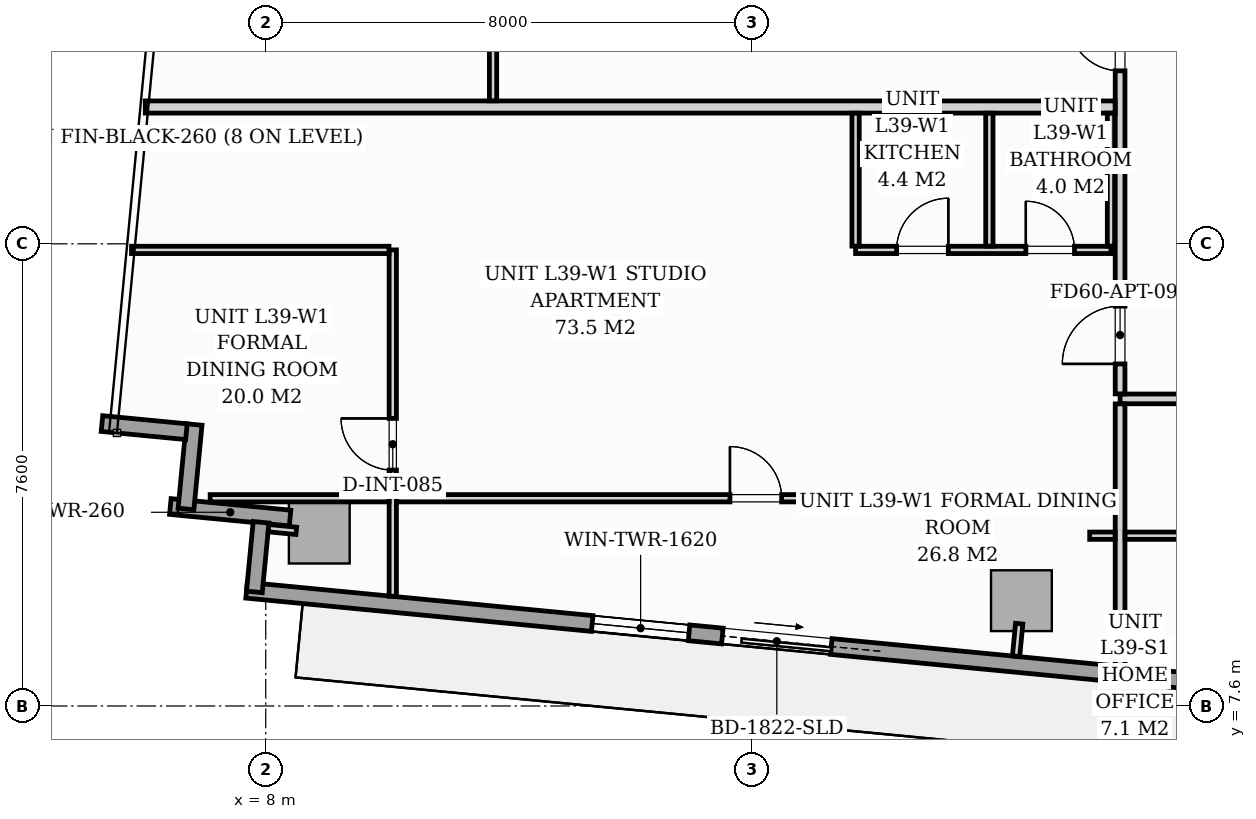
"""IFC4 building model, lengths in metres.
Left out: names, types, materials, properties, quantities, classifications, styles, units other than length and angle.
Written with IfcOpenShell. Run it as: python <this file> out.ifc"""

import sys

from ifc_helpers import new_model, si_unit, direction, frame, frame_2d, origin, origin_2d, place, context, subcontext, project, spatial, rectangle, extrude, source, transform, mapped, element, fill, save


model = new_model("IFC4")
c1 = context("Model", 3, precision=1e-05, world=origin(), true_north=direction((0.0, 1.0)))
c2 = subcontext(c1, "Body", "Model", "MODEL_VIEW")
j1 = project(units=[si_unit("LENGTHUNIT", "METRE"), si_unit("PLANEANGLEUNIT", "RADIAN")], contexts=[c1])
p1 = place(None, origin())
s1 = spatial("IfcSite", under=j1, at=p1, CompositionType="ELEMENT")
p2 = place(p1, origin())
s2 = spatial("IfcBuilding", under=s1, at=p2, CompositionType="ELEMENT")
p3 = place(p2, frame((0.0, 0.0, 137.4)))
s3 = spatial("IfcBuildingStorey", under=s2, at=p3, CompositionType="ELEMENT", Elevation=137.4)
m1 = source(origin(), c2, "Body", "SweptSolid", [
    extrude(rectangle(XDim=1.0, YDim=1.0, at=origin_2d()), origin(), (0.0, 0.0, 1.0), 3.196),
])
for number, where, z_axis, x_axis in (
    (1, (8.881, 10.443, 0.002), (0.0, 0.0, 1.0), (0.995, -0.096, 0.0)),
    (2, (20.427, 9.332, 0.002), (0.0, 0.0, 1.0), (0.995, -0.096, 0.0)),
):
    element("IfcColumn", number, at=place(p3, frame(where, z_axis=z_axis, x_axis=x_axis)), inside=s3, PredefinedType="COLUMN", context=c2, shape_type="MappedRepresentation", body=[
        mapped(m1, transform((0.0, 0.0, 0.0), scale=1.0)),
    ])
p4 = place(p3, frame((8.4, 10.69, 0.0), z_axis=(0.0, 0.0, 1.0), x_axis=(-0.995391147587, 0.095898192396, 0.0)))
e3 = element("IfcWall", 3, at=p4, inside=s3, PredefinedType="STANDARD", context=c2, shape_type="SweptSolid", body=[
    extrude(rectangle(XDim=1.978, YDim=0.26, at=frame_2d((0.989, 0.0))), origin(), (0.0, 0.0, 1.0), 2.94),
])
p5 = place(p3, frame((6.688, 10.84, 0.0), z_axis=(0.0, 0.0, 1.0), x_axis=(0.09589913835, 0.995391056452, 0.0)))
e4 = element("IfcWall", 4, at=p5, inside=s3, PredefinedType="STANDARD", context=c2, shape_type="SweptSolid", body=[
    extrude(rectangle(XDim=1.395, YDim=0.26, at=frame_2d((0.698, 0.0))), origin(), (0.0, 0.0, 1.0), 2.94),
])
p6 = place(p3, frame((6.695, 12.111, 0.0), z_axis=(0.0, 0.0, 1.0), x_axis=(-0.99540614245, 0.095742423056, 0.0)))
e5 = element("IfcWall", 5, at=p6, inside=s3, PredefinedType="STANDARD", context=c2, shape_type="SweptSolid", body=[
    extrude(rectangle(XDim=1.395, YDim=0.26, at=frame_2d((0.697, 0.0))), origin(), (0.0, 0.0, 1.0), 2.94),
])
p7 = place(p3, frame((24.617, 7.873, 0.0), z_axis=(0.0, 0.0, 1.0), x_axis=(-0.995395976631, 0.095848055311, 0.0)))
e6 = element("IfcWall", 6, at=p7, inside=s3, PredefinedType="STANDARD", context=c2, shape_type="SweptSolid", body=[
    extrude(rectangle(XDim=17.01, YDim=0.26, at=frame_2d((8.505, 0.0))), origin(), (0.0, 0.0, 1.0), 2.94),
])
p8 = place(p7, frame((7.35, 0.0, 0.0)))
e7 = element("IfcOpeningElement", 7, at=p8, cuts=e6, PredefinedType="OPENING", context=c2, shape_type="SweptSolid", body=[
    extrude(rectangle(XDim=1.8, YDim=2.06, at=frame_2d((0.9, 1.03))), frame((0.0, 0.14, 0.0), z_axis=(0.0, -1.0, 0.0), x_axis=(1.0, 0.0, 0.0)), (0.0, 0.0, 1.0), 0.28),
])
p9 = place(p7, frame((9.7, 0.0, 0.65)))
e8 = element("IfcOpeningElement", 8, at=p9, cuts=e6, PredefinedType="OPENING", context=c2, shape_type="SweptSolid", body=[
    extrude(rectangle(XDim=1.6, YDim=1.5, at=frame_2d((0.8, 0.75))), frame((0.0, 0.14, 0.0), z_axis=(0.0, -1.0, 0.0), x_axis=(1.0, 0.0, 0.0)), (0.0, 0.0, 1.0), 0.28),
])
p10 = place(p3, frame((7.813, 9.476, 0.0), z_axis=(0.0, 0.0, 1.0), x_axis=(0.09576095695, 0.995404359607, 0.0)))
e9 = element("IfcWall", 9, at=p10, inside=s3, PredefinedType="STANDARD", context=c2, shape_type="SweptSolid", body=[
    extrude(rectangle(XDim=1.15, YDim=0.26, at=frame_2d((0.575, 0.0))), origin(), (0.0, 0.0, 1.0), 2.94),
])
p11 = place(p3, frame((22.05, 12.65, 0.0), z_axis=(0.0, 0.0, 1.0), x_axis=(1.0, 0.0, 0.0)))
e10 = element("IfcWall", 10, at=p11, inside=s3, PredefinedType="PARTITIONING", context=c2, shape_type="SweptSolid", body=[
    extrude(rectangle(XDim=23.83, YDim=0.16, at=frame_2d((11.915, 0.0))), origin(), (0.0, 0.0, 1.0), 2.94),
])
p12 = place(p11, frame((3.0, 0.0, 0.0)))
e11 = element("IfcOpeningElement", 11, at=p12, cuts=e10, PredefinedType="OPENING", context=c2, shape_type="SweptSolid", body=[
    extrude(rectangle(XDim=0.95, YDim=2.06, at=frame_2d((0.475, 1.03))), frame((0.0, 0.09, 0.0), z_axis=(0.0, -1.0, 0.0), x_axis=(1.0, 0.0, 0.0)), (0.0, 0.0, 1.0), 0.18),
])
p13 = place(p11, frame((15.485, 0.0, 0.0)))
e12 = element("IfcOpeningElement", 12, at=p13, cuts=e10, PredefinedType="OPENING", context=c2, shape_type="SweptSolid", body=[
    extrude(rectangle(XDim=0.95, YDim=2.06, at=frame_2d((0.475, 1.03))), frame((0.0, 0.09, 0.0), z_axis=(0.0, -1.0, 0.0), x_axis=(1.0, 0.0, 0.0)), (0.0, 0.0, 1.0), 0.18),
])
p14 = place(p3, frame((22.05, 8.253, 0.0), z_axis=(0.0, 0.0, 1.0), x_axis=(0.0, 1.0, 0.0)))
e13 = element("IfcWall", 13, at=p14, inside=s3, PredefinedType="PARTITIONING", context=c2, shape_type="SweptSolid", body=[
    extrude(rectangle(XDim=4.315, YDim=0.16, at=frame_2d((2.157, 0.0))), origin(), (0.0, 0.0, 1.0), 2.94),
])
p15 = place(p3, frame((22.05, 12.732, 0.0), z_axis=(0.0, 0.0, 1.0), x_axis=(0.0, 1.0, 0.0)))
e14 = element("IfcWall", 14, at=p15, inside=s3, PredefinedType="PARTITIONING", context=c2, shape_type="SweptSolid", body=[
    extrude(rectangle(XDim=14.685, YDim=0.16, at=frame_2d((7.343, 0.0))), origin(), (0.0, 0.0, 1.0), 2.94),
])
p16 = place(p15, frame((0.493, 0.0, 0.0)))
e15 = element("IfcOpeningElement", 15, at=p16, cuts=e14, PredefinedType="OPENING", context=c2, shape_type="SweptSolid", body=[
    extrude(rectangle(XDim=0.95, YDim=2.06, at=frame_2d((0.475, 1.03))), frame((0.0, 0.09, 0.0), z_axis=(0.0, -1.0, 0.0), x_axis=(1.0, 0.0, 0.0)), (0.0, 0.0, 1.0), 0.18),
])
p17 = place(p15, frame((5.313, 0.0, 0.0)))
e16 = element("IfcOpeningElement", 16, at=p17, cuts=e14, PredefinedType="OPENING", context=c2, shape_type="SweptSolid", body=[
    extrude(rectangle(XDim=0.85, YDim=2.0, at=frame_2d((0.425, 1.0))), frame((0.0, 0.09, 0.0), z_axis=(0.0, -1.0, 0.0), x_axis=(1.0, 0.0, 0.0)), (0.0, 0.0, 1.0), 0.18),
])
p18 = place(p3, frame((21.55, 10.4, 0.0), z_axis=(0.0, 0.0, 1.0), x_axis=(1.0, 0.0, 0.0)))
e17 = element("IfcWall", 17, at=p18, inside=s3, PredefinedType="PARTITIONING", context=c2, shape_type="SweptSolid", body=[
    extrude(rectangle(XDim=0.418, YDim=0.12, at=frame_2d((0.209, 0.0))), origin(), (0.0, 0.0, 1.0), 2.94),
])
p19 = place(p3, frame((22.132, 10.4, 0.0), z_axis=(0.0, 0.0, 1.0), x_axis=(1.0, 0.0, 0.0)))
e18 = element("IfcWall", 18, at=p19, inside=s3, PredefinedType="PARTITIONING", context=c2, shape_type="SweptSolid", body=[
    extrude(rectangle(XDim=2.924, YDim=0.12, at=frame_2d((1.462, 0.0))), origin(), (0.0, 0.0, 1.0), 2.94),
])
p20 = place(p3, frame((6.019, 17.45, 0.0), z_axis=(0.0, 0.0, 1.0), x_axis=(1.0, 0.0, 0.0)))
e19 = element("IfcWall", 19, at=p20, inside=s3, PredefinedType="PARTITIONING", context=c2, shape_type="SweptSolid", body=[
    extrude(rectangle(XDim=15.949, YDim=0.2, at=frame_2d((7.975, 0.0))), origin(), (0.0, 0.0, 1.0), 2.94),
])
p21 = place(p3, frame((17.7, 15.1, 0.0), z_axis=(0.0, 0.0, 1.0), x_axis=(1.0, 0.0, 0.0)))
e20 = element("IfcWall", 20, at=p21, inside=s3, PredefinedType="PARTITIONING", context=c2, shape_type="SweptSolid", body=[
    extrude(rectangle(XDim=4.2, YDim=0.12, at=frame_2d((2.1, 0.0))), origin(), (0.0, 0.0, 1.0), 2.94),
])
p22 = place(p21, frame((0.675, 0.0, 0.0)))
e21 = element("IfcOpeningElement", 21, at=p22, cuts=e20, PredefinedType="OPENING", context=c2, shape_type="SweptSolid", body=[
    extrude(rectangle(XDim=0.85, YDim=2.05, at=frame_2d((0.425, 1.025))), frame((0.0, 0.07, 0.0), z_axis=(0.0, -1.0, 0.0), x_axis=(1.0, 0.0, 0.0)), (0.0, 0.0, 1.0), 0.14),
])
p23 = place(p21, frame((2.8, 0.0, 0.0)))
e22 = element("IfcOpeningElement", 22, at=p23, cuts=e20, PredefinedType="OPENING", context=c2, shape_type="SweptSolid", body=[
    extrude(rectangle(XDim=0.8, YDim=2.02, at=frame_2d((0.4, 1.01))), frame((0.0, 0.07, 0.0), z_axis=(0.0, -1.0, 0.0), x_axis=(1.0, 0.0, 0.0)), (0.0, 0.0, 1.0), 0.14),
])
for number, where, z_axis, x_axis in (
    (23, (17.7, 15.162, 0.0), (0.0, 0.0, 1.0), (0.0, 1.0, 0.0)),
    (24, (19.9, 15.162, 0.0), (0.0, 0.0, 1.0), (0.0, 1.0, 0.0)),
    (25, (21.9, 15.162, 0.0), (0.0, 0.0, 1.0), (0.0, 1.0, 0.0)),
):
    element("IfcWall", number, at=place(p3, frame(where, z_axis=z_axis, x_axis=x_axis)), inside=s3, PredefinedType="PARTITIONING", context=c2, shape_type="SweptSolid", body=[
        extrude(rectangle(XDim=2.186, YDim=0.12, at=frame_2d((1.093, 0.0))), origin(), (0.0, 0.0, 1.0), 2.94),
    ])
p24 = place(p3, frame((10.089, 9.405, 0.0), z_axis=(0.0, 0.0, 1.0), x_axis=(0.0, 1.0, 0.0)))
e26 = element("IfcWall", 26, at=p24, inside=s3, PredefinedType="PARTITIONING", context=c2, shape_type="SweptSolid", body=[
    extrude(rectangle(XDim=5.695, YDim=0.12, at=frame_2d((2.848, 0.0))), origin(), (0.0, 0.0, 1.0), 2.94),
])
p25 = place(p24, frame((2.074, 0.0, 0.0)))
e27 = element("IfcOpeningElement", 27, at=p25, cuts=e26, PredefinedType="OPENING", context=c2, shape_type="SweptSolid", body=[
    extrude(rectangle(XDim=0.85, YDim=2.05, at=frame_2d((0.425, 1.025))), frame((0.0, 0.07, 0.0), z_axis=(0.0, -1.0, 0.0), x_axis=(1.0, 0.0, 0.0)), (0.0, 0.0, 1.0), 0.14),
])
p26 = place(p3, frame((5.793, 15.1, 0.0), z_axis=(0.0, 0.0, 1.0), x_axis=(1.0, 0.0, 0.0)))
e28 = element("IfcWall", 28, at=p26, inside=s3, PredefinedType="PARTITIONING", context=c2, shape_type="SweptSolid", body=[
    extrude(rectangle(XDim=4.234, YDim=0.12, at=frame_2d((2.117, 0.0))), origin(), (0.0, 0.0, 1.0), 2.94),
])
p27 = place(p3, frame((7.086, 11.016, 0.0), z_axis=(0.0, 0.0, 1.0), x_axis=(1.0, 0.0, 0.0)))
e29 = element("IfcWall", 29, at=p27, inside=s3, PredefinedType="PARTITIONING", context=c2, shape_type="SweptSolid", body=[
    extrude(rectangle(XDim=2.941, YDim=0.12, at=frame_2d((1.471, 0.0))), origin(), (0.0, 0.0, 1.0), 2.94),
])
p28 = place(p3, frame((10.151, 11.016, 0.0), z_axis=(0.0, 0.0, 1.0), x_axis=(1.0, 0.0, 0.0)))
e30 = element("IfcWall", 30, at=p28, inside=s3, PredefinedType="PARTITIONING", context=c2, shape_type="SweptSolid", body=[
    extrude(rectangle(XDim=11.817, YDim=0.12, at=frame_2d((5.909, 0.0))), origin(), (0.0, 0.0, 1.0), 2.94),
])
p29 = place(p28, frame((5.483, 0.0, 0.0)))
e31 = element("IfcOpeningElement", 31, at=p29, cuts=e30, PredefinedType="OPENING", context=c2, shape_type="SweptSolid", body=[
    extrude(rectangle(XDim=0.85, YDim=2.05, at=frame_2d((0.425, 1.025))), frame((0.0, 0.07, 0.0), z_axis=(0.0, -1.0, 0.0), x_axis=(1.0, 0.0, 0.0)), (0.0, 0.0, 1.0), 0.14),
])
p30 = place(p3, frame((11.738, 17.552, 0.0), z_axis=(0.0, 0.0, 1.0), x_axis=(0.0, 1.0, 0.0)))
e32 = element("IfcWall", 32, at=p30, inside=s3, PredefinedType="PARTITIONING", context=c2, shape_type="SweptSolid", body=[
    extrude(rectangle(XDim=7.654, YDim=0.12, at=frame_2d((3.827, 0.0))), origin(), (0.0, 0.0, 1.0), 2.94),
])
p31 = place(p30, frame((3.402, 0.0, 0.0)))
e33 = element("IfcOpeningElement", 33, at=p31, cuts=e32, PredefinedType="OPENING", context=c2, shape_type="SweptSolid", body=[
    extrude(rectangle(XDim=0.85, YDim=2.05, at=frame_2d((0.425, 1.025))), frame((0.0, 0.07, 0.0), z_axis=(0.0, -1.0, 0.0), x_axis=(1.0, 0.0, 0.0)), (0.0, 0.0, 1.0), 0.14),
])
p32 = place(p3, frame((8.502, 10.48, 0.0), z_axis=(0.0, 0.0, 1.0), x_axis=(-0.995384576284, 0.09596637586, 0.0)))
e34 = element("IfcWall", 34, at=p32, inside=s3, PredefinedType="PARTITIONING", context=c2, shape_type="SweptSolid", body=[
    extrude(rectangle(XDim=0.458, YDim=0.12, at=frame_2d((0.229, 0.0))), origin(), (0.0, 0.0, 1.0), 2.94),
])
p33 = place(p3, frame((20.391, 8.953, 0.0), z_axis=(0.0, 0.0, 1.0), x_axis=(-0.096222656154, -0.995359834654, 0.0)))
e35 = element("IfcWall", 35, at=p33, inside=s3, PredefinedType="PARTITIONING", context=c2, shape_type="SweptSolid", body=[
    extrude(rectangle(XDim=0.538, YDim=0.12, at=frame_2d((0.269, 0.0))), origin(), (0.0, 0.0, 1.0), 2.94),
])
m2 = source(origin(), c2, "Body", "SweptSolid", [
    extrude(rectangle(XDim=1.8, YDim=2.06, at=frame_2d((0.9, 1.03))), frame((0.0, 0.025, 0.0), z_axis=(0.0, -1.0, 0.0), x_axis=(1.0, 0.0, 0.0)), (0.0, 0.0, 1.0), 0.05),
])
p34 = place(p8, origin())
e36 = element("IfcDoor", 36, at=p34, inside=s3, OperationType="SLIDING_TO_LEFT", PredefinedType="DOOR", context=c2, shape_type="MappedRepresentation", body=[
    mapped(m2, transform((0.0, 0.0, 0.0), scale=1.0)),
])
fill(e7, e36)
m3 = source(origin(), c2, "Body", "SweptSolid", [
    extrude(rectangle(XDim=1.6, YDim=1.5, at=frame_2d((0.8, 0.75))), frame((0.0, 0.03, 0.0), z_axis=(0.0, -1.0, 0.0), x_axis=(1.0, 0.0, 0.0)), (0.0, 0.0, 1.0), 0.06),
])
p35 = place(p9, origin())
e37 = element("IfcWindow", 37, at=p35, inside=s3, PartitioningType="SINGLE_PANEL", PredefinedType="WINDOW", context=c2, shape_type="MappedRepresentation", body=[
    mapped(m3, transform((0.0, 0.0, 0.0), scale=1.0)),
])
fill(e8, e37)
m4 = source(origin(), c2, "Body", "SweptSolid", [
    extrude(rectangle(XDim=0.95, YDim=2.06, at=frame_2d((0.475, 1.03))), frame((0.0, 0.025, 0.0), z_axis=(0.0, -1.0, 0.0), x_axis=(1.0, 0.0, 0.0)), (0.0, 0.0, 1.0), 0.05),
])
p36 = place(p16, origin())
e38 = element("IfcDoor", 38, at=p36, inside=s3, OperationType="SINGLE_SWING_LEFT", PredefinedType="DOOR", context=c2, shape_type="MappedRepresentation", body=[
    mapped(m4, transform((0.0, 0.0, 0.0), scale=1.0)),
])
fill(e15, e38)
m5 = source(origin(), c2, "Body", "SweptSolid", [
    extrude(rectangle(XDim=0.85, YDim=2.05, at=frame_2d((0.425, 1.025))), frame((0.0, 0.025, 0.0), z_axis=(0.0, -1.0, 0.0), x_axis=(1.0, 0.0, 0.0)), (0.0, 0.0, 1.0), 0.05),
])
p37 = place(p25, origin())
e39 = element("IfcDoor", 39, at=p37, inside=s3, OperationType="SINGLE_SWING_RIGHT", PredefinedType="DOOR", context=c2, shape_type="MappedRepresentation", body=[
    mapped(m5, transform((0.0, 0.0, 0.0), scale=1.0)),
])
fill(e27, e39)
p38 = place(p29, origin())
e40 = element("IfcDoor", 40, at=p38, inside=s3, OperationType="SINGLE_SWING_LEFT", PredefinedType="DOOR", context=c2, shape_type="MappedRepresentation", body=[
    mapped(m5, transform((0.0, 0.0, 0.0), scale=1.0)),
])
fill(e31, e40)
p39 = place(p22, origin())
e41 = element("IfcDoor", 41, at=p39, inside=s3, OperationType="SINGLE_SWING_RIGHT", PredefinedType="DOOR", context=c2, shape_type="MappedRepresentation", body=[
    mapped(m5, transform((0.0, 0.0, 0.0), scale=1.0)),
])
fill(e21, e41)
m6 = source(origin(), c2, "Body", "SweptSolid", [
    extrude(rectangle(XDim=0.8, YDim=2.02, at=frame_2d((0.4, 1.01))), frame((0.0, 0.025, 0.0), z_axis=(0.0, -1.0, 0.0), x_axis=(1.0, 0.0, 0.0)), (0.0, 0.0, 1.0), 0.05),
])
p40 = place(p23, origin())
e42 = element("IfcDoor", 42, at=p40, inside=s3, OperationType="SINGLE_SWING_LEFT", PredefinedType="DOOR", context=c2, shape_type="MappedRepresentation", body=[
    mapped(m6, transform((0.0, 0.0, 0.0), scale=1.0)),
])
fill(e22, e42)
m7 = source(origin(), c2, "Body", "SweptSolid", [
    extrude(rectangle(XDim=0.85, YDim=2.0, at=frame_2d((0.425, 1.0))), frame((0.0, 0.025, 0.0), z_axis=(0.0, -1.0, 0.0), x_axis=(1.0, 0.0, 0.0)), (0.0, 0.0, 1.0), 0.05),
])
p41 = place(p17, origin())
e43 = element("IfcDoor", 43, at=p41, inside=s3, OperationType="SINGLE_SWING_RIGHT", PredefinedType="DOOR", context=c2, shape_type="MappedRepresentation", body=[
    mapped(m7, transform((0.0, 0.0, 0.0), scale=1.0)),
])
fill(e16, e43)
save(model, sys.argv[1])
